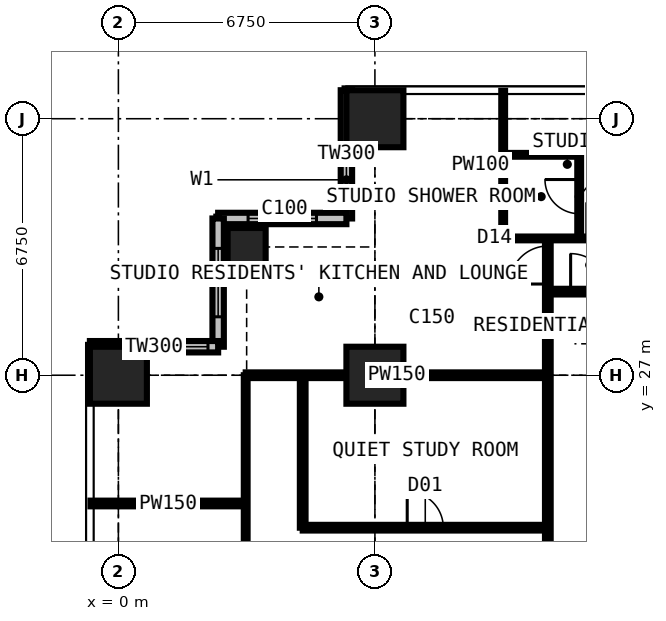
"""IFC4 building model, lengths in metres.
Left out: names, types, materials, properties, quantities, classifications, styles, units other than length and angle.
Written with IfcOpenShell. Run it as: python <this file> out.ifc"""

import sys

from ifc_helpers import new_model, si_unit, direction, frame, frame_2d, origin, origin_2d, place, context, subcontext, project, spatial, rectangle, extrude, element, fill, save


model = new_model("IFC4")
c1 = context("Model", 3, precision=1e-05, world=origin(), true_north=direction((0.0, 1.0)))
c2 = subcontext(c1, "Body", "Model", "MODEL_VIEW")
j1 = project(units=[si_unit("LENGTHUNIT", "METRE"), si_unit("PLANEANGLEUNIT", "RADIAN")], contexts=[c1])
p1 = place(None, origin())
s1 = spatial("IfcSite", under=j1, at=p1, CompositionType="ELEMENT")
p2 = place(p1, origin())
s2 = spatial("IfcBuilding", under=s1, at=p2, CompositionType="ELEMENT")
p3 = place(p2, frame((0.0, 0.0, 119.7)))
s3 = spatial("IfcBuildingStorey", under=s2, at=p3, CompositionType="ELEMENT", Elevation=119.7)
p4 = place(p3, frame((0.0, 27.0, 0.0), z_axis=(0.0, 0.0, 1.0), x_axis=(1.0, 0.0, 0.0)))
e1 = element("IfcColumn", 1, at=p4, inside=s3, PredefinedType="COLUMN", context=c2, shape_type="SweptSolid", body=[
    extrude(rectangle(XDim=1.5, YDim=1.5, at=origin_2d()), origin(), (0.0, 0.0, 1.0), 3.6),
])
p5 = place(p3, frame((3.375, 30.375, 0.0), z_axis=(0.0, 0.0, 1.0), x_axis=(1.0, 0.0, 0.0)))
e2 = element("IfcColumn", 2, at=p5, inside=s3, PredefinedType="COLUMN", context=c2, shape_type="SweptSolid", body=[
    extrude(rectangle(XDim=1.0, YDim=1.0, at=origin_2d()), origin(), (0.0, 0.0, 1.0), 3.6),
])
for number, where, z_axis, x_axis in (
    (3, (6.75, 27.0, 0.0), (0.0, 0.0, 1.0), (1.0, 0.0, 0.0)),
    (4, (6.75, 33.75, 0.0), (0.0, 0.0, 1.0), (1.0, 0.0, 0.0)),
):
    element("IfcColumn", number, at=place(p3, frame(where, z_axis=z_axis, x_axis=x_axis)), inside=s3, PredefinedType="COLUMN", context=c2, shape_type="SweptSolid", body=[
        extrude(rectangle(XDim=1.5, YDim=1.5, at=origin_2d()), origin(), (0.0, 0.0, 1.0), 3.6),
    ])
p6 = place(p3, frame((6.0, 34.5, 0.0), z_axis=(0.0, 0.0, 1.0), x_axis=(0.0, -1.0, 0.0)))
e5 = element("IfcWall", 5, at=p6, inside=s3, PredefinedType="SOLIDWALL", context=c2, shape_type="SweptSolid", body=[
    extrude(rectangle(XDim=3.375, YDim=0.3, at=frame_2d((1.688, 0.0))), origin(), (0.0, 0.0, 1.0), 3.375),
])
p7 = place(p6, frame((1.607, 0.0, 0.9)))
e6 = element("IfcOpeningElement", 6, at=p7, cuts=e5, PredefinedType="OPENING", context=c2, shape_type="SweptSolid", body=[
    extrude(rectangle(XDim=1.5, YDim=1.8, at=frame_2d((0.75, 0.9))), frame((0.0, 0.16, 0.0), z_axis=(0.0, -1.0, 0.0), x_axis=(1.0, 0.0, 0.0)), (0.0, 0.0, 1.0), 0.32),
])
p8 = place(p3, frame((6.0, 31.125, 0.0), z_axis=(0.0, 0.0, 1.0), x_axis=(-1.0, 0.0, 0.0)))
e7 = element("IfcWall", 7, at=p8, inside=s3, PredefinedType="SOLIDWALL", context=c2, shape_type="SweptSolid", body=[
    extrude(rectangle(XDim=3.375, YDim=0.3, at=frame_2d((1.688, 0.0))), origin(), (0.0, 0.0, 1.0), 3.375),
])
p9 = place(p8, frame((0.788, 0.0, 0.6)))
e8 = element("IfcOpeningElement", 8, at=p9, cuts=e7, PredefinedType="OPENING", context=c2, shape_type="SweptSolid", body=[
    extrude(rectangle(XDim=1.8, YDim=2.1, at=frame_2d((0.9, 1.05))), frame((0.0, 0.16, 0.0), z_axis=(0.0, -1.0, 0.0), x_axis=(1.0, 0.0, 0.0)), (0.0, 0.0, 1.0), 0.32),
])
p10 = place(p3, frame((2.625, 31.125, 0.0), z_axis=(0.0, 0.0, 1.0), x_axis=(0.0, -1.0, 0.0)))
e9 = element("IfcWall", 9, at=p10, inside=s3, PredefinedType="SOLIDWALL", context=c2, shape_type="SweptSolid", body=[
    extrude(rectangle(XDim=3.375, YDim=0.3, at=frame_2d((1.688, 0.0))), origin(), (0.0, 0.0, 1.0), 3.375),
])
p11 = place(p10, frame((0.788, 0.0, 0.6)))
e10 = element("IfcOpeningElement", 10, at=p11, cuts=e9, PredefinedType="OPENING", context=c2, shape_type="SweptSolid", body=[
    extrude(rectangle(XDim=1.8, YDim=2.1, at=frame_2d((0.9, 1.05))), frame((0.0, 0.16, 0.0), z_axis=(0.0, -1.0, 0.0), x_axis=(1.0, 0.0, 0.0)), (0.0, 0.0, 1.0), 0.32),
])
p12 = place(p3, frame((2.625, 27.75, 0.0), z_axis=(0.0, 0.0, 1.0), x_axis=(-1.0, 0.0, 0.0)))
e11 = element("IfcWall", 11, at=p12, inside=s3, PredefinedType="SOLIDWALL", context=c2, shape_type="SweptSolid", body=[
    extrude(rectangle(XDim=3.375, YDim=0.3, at=frame_2d((1.688, 0.0))), origin(), (0.0, 0.0, 1.0), 3.375),
])
p13 = place(p12, frame((0.268, 0.0, 0.9)))
e12 = element("IfcOpeningElement", 12, at=p13, cuts=e11, PredefinedType="OPENING", context=c2, shape_type="SweptSolid", body=[
    extrude(rectangle(XDim=1.5, YDim=1.8, at=frame_2d((0.75, 0.9))), frame((0.0, 0.16, 0.0), z_axis=(0.0, -1.0, 0.0), x_axis=(1.0, 0.0, 0.0)), (0.0, 0.0, 1.0), 0.32),
])
p14 = place(p3, frame((-0.734, 23.625, 0.0), z_axis=(0.0, 0.0, 1.0), x_axis=(1.0, 0.0, 0.0)))
e13 = element("IfcWall", 13, at=p14, inside=s3, PredefinedType="PARTITIONING", context=c2, shape_type="SweptSolid", body=[
    extrude(rectangle(XDim=4.084, YDim=0.15, at=frame_2d((2.042, 0.0))), origin(), (0.0, 0.0, 1.0), 3.375),
])
p15 = place(p3, frame((3.35, 10.125, 0.0), z_axis=(0.0, 0.0, 1.0), x_axis=(0.0, 1.0, 0.0)))
e14 = element("IfcWall", 14, at=p15, inside=s3, PredefinedType="PARTITIONING", context=c2, shape_type="SweptSolid", body=[
    extrude(rectangle(XDim=16.875, YDim=0.1, at=frame_2d((8.438, 0.0))), origin(), (0.0, 0.0, 1.0), 3.375),
])
p16 = place(p15, frame((4.2, 0.0, 0.0)))
e15 = element("IfcOpeningElement", 15, at=p16, cuts=e14, PredefinedType="OPENING", context=c2, shape_type="SweptSolid", body=[
    extrude(rectangle(XDim=0.95, YDim=2.2, at=frame_2d((0.475, 1.1))), frame((0.0, 0.06, 0.0), z_axis=(0.0, -1.0, 0.0), x_axis=(1.0, 0.0, 0.0)), (0.0, 0.0, 1.0), 0.12),
])
p17 = place(p15, frame((10.95, 0.0, 0.0)))
e16 = element("IfcOpeningElement", 16, at=p17, cuts=e14, PredefinedType="OPENING", context=c2, shape_type="SweptSolid", body=[
    extrude(rectangle(XDim=0.95, YDim=2.2, at=frame_2d((0.475, 1.1))), frame((0.0, 0.06, 0.0), z_axis=(0.0, -1.0, 0.0), x_axis=(1.0, 0.0, 0.0)), (0.0, 0.0, 1.0), 0.12),
])
p18 = place(p3, frame((3.35, 27.0, 0.0), z_axis=(0.0, 0.0, 1.0), x_axis=(1.0, 0.0, 0.0)))
e17 = element("IfcWall", 17, at=p18, inside=s3, PredefinedType="PARTITIONING", context=c2, shape_type="SweptSolid", body=[
    extrude(rectangle(XDim=7.95, YDim=0.15, at=frame_2d((3.975, 0.0))), origin(), (0.0, 0.0, 1.0), 2.806),
])
p19 = place(p3, frame((4.85, 22.988, 0.0), z_axis=(0.0, 0.0, 1.0), x_axis=(0.0, 1.0, 0.0)))
e18 = element("IfcWall", 18, at=p19, inside=s3, PredefinedType="PARTITIONING", context=c2, shape_type="SweptSolid", body=[
    extrude(rectangle(XDim=4.012, YDim=0.15, at=frame_2d((2.006, 0.0))), origin(), (0.0, 0.0, 1.0), 3.375),
])
p20 = place(p3, frame((4.85, 22.988, 0.0), z_axis=(0.0, 0.0, 1.0), x_axis=(1.0, 0.0, 0.0)))
e19 = element("IfcWall", 19, at=p20, inside=s3, PredefinedType="PARTITIONING", context=c2, shape_type="SweptSolid", body=[
    extrude(rectangle(XDim=6.45, YDim=0.15, at=frame_2d((3.225, 0.0))), origin(), (0.0, 0.0, 1.0), 3.375),
])
p21 = place(p20, frame((2.75, 0.0, 0.0)))
e20 = element("IfcOpeningElement", 20, at=p21, cuts=e19, PredefinedType="OPENING", context=c2, shape_type="SweptSolid", body=[
    extrude(rectangle(XDim=0.95, YDim=2.2, at=frame_2d((0.475, 1.1))), frame((0.0, 0.085, 0.0), z_axis=(0.0, -1.0, 0.0), x_axis=(1.0, 0.0, 0.0)), (0.0, 0.0, 1.0), 0.17),
])
p22 = place(p3, frame((10.125, 30.6, 0.0), z_axis=(0.0, 0.0, 1.0), x_axis=(0.0, 1.0, 0.0)))
e21 = element("IfcWall", 21, at=p22, inside=s3, PredefinedType="PARTITIONING", context=c2, shape_type="SweptSolid", body=[
    extrude(rectangle(XDim=3.884, YDim=0.1, at=frame_2d((1.942, 0.0))), origin(), (0.0, 0.0, 1.0), 3.375),
])
p23 = place(p3, frame((10.125, 30.6, 0.0), z_axis=(0.0, 0.0, 1.0), x_axis=(1.0, 0.0, 0.0)))
e22 = element("IfcWall", 22, at=p23, inside=s3, PredefinedType="PARTITIONING", context=c2, shape_type="SweptSolid", body=[
    extrude(rectangle(XDim=3.375, YDim=0.1, at=frame_2d((1.688, 0.0))), origin(), (0.0, 0.0, 1.0), 3.375),
])
p24 = place(p23, frame((2.2, 0.0, 0.0)))
e23 = element("IfcOpeningElement", 23, at=p24, cuts=e22, PredefinedType="OPENING", context=c2, shape_type="SweptSolid", body=[
    extrude(rectangle(XDim=0.95, YDim=2.2, at=frame_2d((0.475, 1.1))), frame((0.0, 0.06, 0.0), z_axis=(0.0, -1.0, 0.0), x_axis=(1.0, 0.0, 0.0)), (0.0, 0.0, 1.0), 0.12),
])
p25 = place(p3, frame((10.125, 32.8, 0.0), z_axis=(0.0, 0.0, 1.0), x_axis=(1.0, 0.0, 0.0)))
e24 = element("IfcWall", 24, at=p25, inside=s3, PredefinedType="PARTITIONING", context=c2, shape_type="SweptSolid", body=[
    extrude(rectangle(XDim=2.0, YDim=0.1, at=frame_2d((1.0, 0.0))), origin(), (0.0, 0.0, 1.0), 3.375),
])
p26 = place(p3, frame((11.3, 11.3, 0.0), z_axis=(0.0, 0.0, 1.0), x_axis=(0.0, 1.0, 0.0)))
e25 = element("IfcWall", 25, at=p26, inside=s3, PredefinedType="PARTITIONING", context=c2, shape_type="SweptSolid", body=[
    extrude(rectangle(XDim=19.3, YDim=0.15, at=frame_2d((9.65, 0.0))), origin(), (0.0, 0.0, 1.0), 3.375),
])
p27 = place(p26, frame((18.1, 0.0, 0.0)))
e26 = element("IfcOpeningElement", 26, at=p27, cuts=e25, PredefinedType="OPENING", context=c2, shape_type="SweptSolid", body=[
    extrude(rectangle(XDim=1.0, YDim=2.2, at=frame_2d((0.5, 1.1))), frame((0.0, 0.085, 0.0), z_axis=(0.0, -1.0, 0.0), x_axis=(1.0, 0.0, 0.0)), (0.0, 0.0, 1.0), 0.17),
])
p28 = place(p26, frame((10.137, 0.0, 0.0)))
e27 = element("IfcOpeningElement", 27, at=p28, cuts=e25, PredefinedType="OPENING", context=c2, shape_type="SweptSolid", body=[
    extrude(rectangle(XDim=1.0, YDim=2.2, at=frame_2d((0.5, 1.1))), frame((0.0, 0.085, 0.0), z_axis=(0.0, -1.0, 0.0), x_axis=(1.0, 0.0, 0.0)), (0.0, 0.0, 1.0), 0.17),
])
p29 = place(p3, frame((11.3, 29.2, 0.0), z_axis=(0.0, 0.0, 1.0), x_axis=(1.0, 0.0, 0.0)))
e28 = element("IfcWall", 28, at=p29, inside=s3, PredefinedType="PARTITIONING", context=c2, shape_type="SweptSolid", body=[
    extrude(rectangle(XDim=19.075, YDim=0.15, at=frame_2d((9.538, 0.0))), origin(), (0.0, 0.0, 1.0), 3.375),
])
p30 = place(p29, frame((5.825, 0.0, 0.0)))
e29 = element("IfcOpeningElement", 29, at=p30, cuts=e28, PredefinedType="OPENING", context=c2, shape_type="SweptSolid", body=[
    extrude(rectangle(XDim=0.95, YDim=2.2, at=frame_2d((0.475, 1.1))), frame((0.0, 0.085, 0.0), z_axis=(0.0, -1.0, 0.0), x_axis=(1.0, 0.0, 0.0)), (0.0, 0.0, 1.0), 0.17),
])
p31 = place(p29, frame((9.2, 0.0, 0.0)))
e30 = element("IfcOpeningElement", 30, at=p31, cuts=e28, PredefinedType="OPENING", context=c2, shape_type="SweptSolid", body=[
    extrude(rectangle(XDim=0.95, YDim=2.2, at=frame_2d((0.475, 1.1))), frame((0.0, 0.085, 0.0), z_axis=(0.0, -1.0, 0.0), x_axis=(1.0, 0.0, 0.0)), (0.0, 0.0, 1.0), 0.17),
])
p32 = place(p29, frame((12.575, 0.0, 0.0)))
e31 = element("IfcOpeningElement", 31, at=p32, cuts=e28, PredefinedType="OPENING", context=c2, shape_type="SweptSolid", body=[
    extrude(rectangle(XDim=0.95, YDim=2.2, at=frame_2d((0.475, 1.1))), frame((0.0, 0.085, 0.0), z_axis=(0.0, -1.0, 0.0), x_axis=(1.0, 0.0, 0.0)), (0.0, 0.0, 1.0), 0.17),
])
p33 = place(p29, frame((15.95, 0.0, 0.0)))
e32 = element("IfcOpeningElement", 32, at=p33, cuts=e28, PredefinedType="OPENING", context=c2, shape_type="SweptSolid", body=[
    extrude(rectangle(XDim=0.95, YDim=2.2, at=frame_2d((0.475, 1.1))), frame((0.0, 0.085, 0.0), z_axis=(0.0, -1.0, 0.0), x_axis=(1.0, 0.0, 0.0)), (0.0, 0.0, 1.0), 0.17),
])
p34 = place(p29, frame((0.6, 0.0, 0.0)))
e33 = element("IfcOpeningElement", 33, at=p34, cuts=e28, PredefinedType="OPENING", context=c2, shape_type="SweptSolid", body=[
    extrude(rectangle(XDim=1.0, YDim=2.2, at=frame_2d((0.5, 1.1))), frame((0.0, 0.085, 0.0), z_axis=(0.0, -1.0, 0.0), x_axis=(1.0, 0.0, 0.0)), (0.0, 0.0, 1.0), 0.17),
])
p35 = place(p3, frame((12.125, 30.6, 0.0), z_axis=(0.0, 0.0, 1.0), x_axis=(0.0, 1.0, 0.0)))
e34 = element("IfcWall", 34, at=p35, inside=s3, PredefinedType="PARTITIONING", context=c2, shape_type="SweptSolid", body=[
    extrude(rectangle(XDim=2.2, YDim=0.1, at=frame_2d((1.1, 0.0))), origin(), (0.0, 0.0, 1.0), 3.375),
])
p36 = place(p35, frame((0.65, 0.0, 0.0)))
e35 = element("IfcOpeningElement", 35, at=p36, cuts=e34, PredefinedType="OPENING", context=c2, shape_type="SweptSolid", body=[
    extrude(rectangle(XDim=0.9, YDim=2.2, at=frame_2d((0.45, 1.1))), frame((0.0, 0.06, 0.0), z_axis=(0.0, -1.0, 0.0), x_axis=(1.0, 0.0, 0.0)), (0.0, 0.0, 1.0), 0.12),
])
p37 = place(p7, origin())
e36 = element("IfcWindow", 36, at=p37, inside=s3, PartitioningType="SINGLE_PANEL", PredefinedType="WINDOW", context=c2, shape_type="SweptSolid", body=[
    extrude(rectangle(XDim=1.5, YDim=1.8, at=frame_2d((0.75, 0.9))), frame((0.0, 0.03, 0.0), z_axis=(0.0, -1.0, 0.0), x_axis=(1.0, 0.0, 0.0)), (0.0, 0.0, 1.0), 0.06),
])
fill(e6, e36)
p38 = place(p9, origin())
e37 = element("IfcWindow", 37, at=p38, inside=s3, PartitioningType="SINGLE_PANEL", PredefinedType="WINDOW", context=c2, shape_type="SweptSolid", body=[
    extrude(rectangle(XDim=1.8, YDim=2.1, at=frame_2d((0.9, 1.05))), frame((0.0, 0.03, 0.0), z_axis=(0.0, -1.0, 0.0), x_axis=(1.0, 0.0, 0.0)), (0.0, 0.0, 1.0), 0.06),
])
fill(e8, e37)
p39 = place(p11, origin())
e38 = element("IfcWindow", 38, at=p39, inside=s3, PartitioningType="SINGLE_PANEL", PredefinedType="WINDOW", context=c2, shape_type="SweptSolid", body=[
    extrude(rectangle(XDim=1.8, YDim=2.1, at=frame_2d((0.9, 1.05))), frame((0.0, 0.03, 0.0), z_axis=(0.0, -1.0, 0.0), x_axis=(1.0, 0.0, 0.0)), (0.0, 0.0, 1.0), 0.06),
])
fill(e10, e38)
p40 = place(p13, origin())
e39 = element("IfcWindow", 39, at=p40, inside=s3, PartitioningType="SINGLE_PANEL", PredefinedType="WINDOW", context=c2, shape_type="SweptSolid", body=[
    extrude(rectangle(XDim=1.5, YDim=1.8, at=frame_2d((0.75, 0.9))), frame((0.0, 0.03, 0.0), z_axis=(0.0, -1.0, 0.0), x_axis=(1.0, 0.0, 0.0)), (0.0, 0.0, 1.0), 0.06),
])
fill(e12, e39)
p41 = place(p36, origin())
e40 = element("IfcDoor", 40, at=p41, inside=s3, OperationType="SINGLE_SWING_RIGHT", PredefinedType="DOOR", context=c2, shape_type="SweptSolid", body=[
    extrude(rectangle(XDim=0.9, YDim=2.2, at=frame_2d((0.45, 1.1))), frame((0.0, 0.025, 0.0), z_axis=(0.0, -1.0, 0.0), x_axis=(1.0, 0.0, 0.0)), (0.0, 0.0, 1.0), 0.05),
])
fill(e35, e40)
p42 = place(p34, origin())
e41 = element("IfcDoor", 41, at=p42, inside=s3, OperationType="SINGLE_SWING_LEFT", PredefinedType="DOOR", context=c2, shape_type="SweptSolid", body=[
    extrude(rectangle(XDim=1.0, YDim=2.2, at=frame_2d((0.5, 1.1))), frame((0.0, 0.025, 0.0), z_axis=(0.0, -1.0, 0.0), x_axis=(1.0, 0.0, 0.0)), (0.0, 0.0, 1.0), 0.05),
])
fill(e33, e41)
p43 = place(p27, origin())
e42 = element("IfcDoor", 42, at=p43, inside=s3, OperationType="SINGLE_SWING_LEFT", PredefinedType="DOOR", context=c2, shape_type="SweptSolid", body=[
    extrude(rectangle(XDim=1.0, YDim=2.2, at=frame_2d((0.5, 1.1))), frame((0.0, 0.025, 0.0), z_axis=(0.0, -1.0, 0.0), x_axis=(1.0, 0.0, 0.0)), (0.0, 0.0, 1.0), 0.05),
])
fill(e26, e42)
p44 = place(p21, origin())
e43 = element("IfcDoor", 43, at=p44, inside=s3, OperationType="SINGLE_SWING_LEFT", PredefinedType="DOOR", context=c2, shape_type="SweptSolid", body=[
    extrude(rectangle(XDim=0.95, YDim=2.2, at=frame_2d((0.475, 1.1))), frame((0.0, 0.025, 0.0), z_axis=(0.0, -1.0, 0.0), x_axis=(1.0, 0.0, 0.0)), (0.0, 0.0, 1.0), 0.05),
])
fill(e20, e43)
save(model, sys.argv[1])
